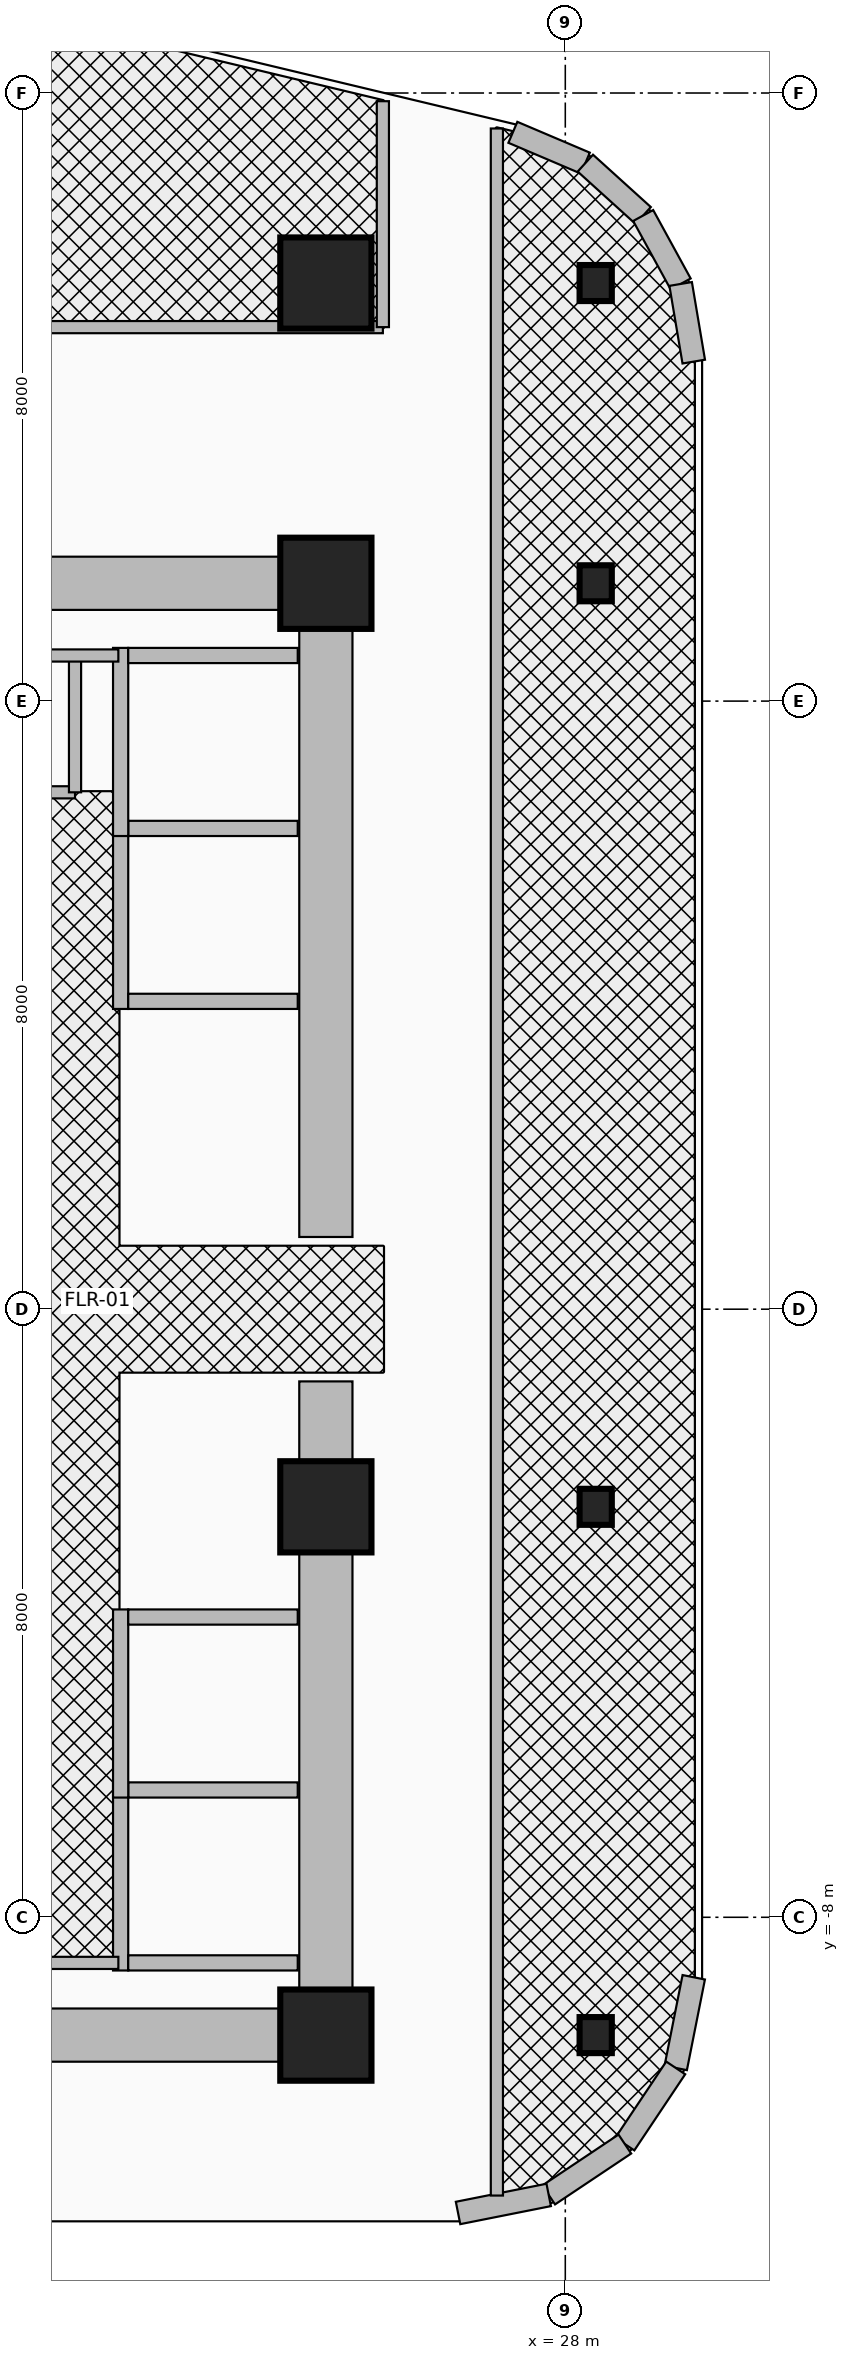
"""IFC4 building model, lengths in metres.
Left out: names, types, materials, properties, quantities, classifications, styles, units other than length and angle.
Written with IfcOpenShell. Run it as: python <this file> out.ifc"""

import sys

from ifc_helpers import new_model, si_unit, direction, frame, frame_2d, origin, origin_2d, place, context, subcontext, project, spatial, rectangle, i_section, extrude, source, transform, mapped, element, fill, save


model = new_model("IFC4")
c1 = context("Model", 3, precision=1e-05, world=origin(), true_north=direction((0.0, 1.0)))
c2 = subcontext(c1, "Body", "Model", "MODEL_VIEW")
j1 = project(units=[si_unit("LENGTHUNIT", "METRE"), si_unit("PLANEANGLEUNIT", "RADIAN")], contexts=[c1])
p1 = place(None, origin())
s1 = spatial("IfcSite", under=j1, at=p1, CompositionType="ELEMENT")
p2 = place(p1, origin())
s2 = spatial("IfcBuilding", under=s1, at=p2, CompositionType="ELEMENT")
p3 = place(p2, frame((0.0, 0.0, 101.1)))
s3 = spatial("IfcBuildingStorey", under=s2, at=p3, CompositionType="ELEMENT", Elevation=101.1)
for number, where, z_axis, x_axis in (
    (1, (24.85, -9.9, 0.0), (0.0, 0.0, 1.0), (0.0, 1.0, 0.0)),
    (2, (24.85, 0.95, 0.0), (0.0, 0.0, 1.0), (0.0, 1.0, 0.0)),
):
    element("IfcWall", number, at=place(p3, frame(where, z_axis=z_axis, x_axis=x_axis)), inside=s3, PredefinedType="SHEAR", context=c2, shape_type="SweptSolid", body=[
        extrude(rectangle(XDim=8.95, YDim=0.7, at=frame_2d((4.475, 0.0))), origin(), (0.0, 0.0, 1.0), 4.36),
    ])
for number, where, z_axis, x_axis in (
    (3, (15.85, 9.55, 0.0), (0.0, 0.0, 1.0), (1.0, 0.0, 0.0)),
    (4, (15.85, -9.55, 0.0), (0.0, 0.0, 1.0), (1.0, 0.0, 0.0)),
):
    element("IfcWall", number, at=place(p3, frame(where, z_axis=z_axis, x_axis=x_axis)), inside=s3, PredefinedType="SHEAR", context=c2, shape_type="SweptSolid", body=[
        extrude(rectangle(XDim=9.0, YDim=0.7, at=frame_2d((4.5, 0.0))), origin(), (0.0, 0.0, 1.0), 4.36),
    ])
m1 = source(origin(), c2, "Body", "SweptSolid", [
    extrude(rectangle(XDim=1.2, YDim=1.2, at=origin_2d()), origin(), (0.0, 0.0, 1.0), 4.6),
])
p4 = place(p3, frame((24.85, -9.55, 0.0), z_axis=(0.0, 0.0, 1.0), x_axis=(1.0, 0.0, 0.0)))
e5 = element("IfcColumn", 5, at=p4, inside=s3, PredefinedType="COLUMN", context=c2, shape_type="MappedRepresentation", body=[
    mapped(m1, transform((0.0, 0.0, 0.0), x_axis=(1.0, 0.0, 0.0), y_axis=(0.0, 1.0, 0.0), z_axis=(0.0, 0.0, 1.0), scale=1.0)),
])
m2 = source(origin(), c2, "Body", "SweptSolid", [
    extrude(i_section(OverallWidth=0.424, OverallDepth=0.474, WebThickness=0.048, FlangeThickness=0.077, at=origin_2d()), origin(), (0.0, 0.0, 1.0), 4.6),
])
p5 = place(p3, frame((28.4, -9.55, 0.0), z_axis=(0.0, 0.0, 1.0), x_axis=(1.0, 0.0, 0.0)))
e6 = element("IfcColumn", 6, at=p5, inside=s3, PredefinedType="COLUMN", context=c2, shape_type="MappedRepresentation", body=[
    mapped(m2, transform((0.0, 0.0, 0.0), x_axis=(1.0, 0.0, 0.0), y_axis=(0.0, 1.0, 0.0), z_axis=(0.0, 0.0, 1.0), scale=1.0)),
])
p6 = place(p3, frame((24.85, -2.6, 0.0), z_axis=(0.0, 0.0, 1.0), x_axis=(1.0, 0.0, 0.0)))
e7 = element("IfcColumn", 7, at=p6, inside=s3, PredefinedType="COLUMN", context=c2, shape_type="MappedRepresentation", body=[
    mapped(m1, transform((0.0, 0.0, 0.0), x_axis=(1.0, 0.0, 0.0), y_axis=(0.0, 1.0, 0.0), z_axis=(0.0, 0.0, 1.0), scale=1.0)),
])
p7 = place(p3, frame((28.4, -2.6, 0.0), z_axis=(0.0, 0.0, 1.0), x_axis=(1.0, 0.0, 0.0)))
e8 = element("IfcColumn", 8, at=p7, inside=s3, PredefinedType="COLUMN", context=c2, shape_type="MappedRepresentation", body=[
    mapped(m2, transform((0.0, 0.0, 0.0), x_axis=(1.0, 0.0, 0.0), y_axis=(0.0, 1.0, 0.0), z_axis=(0.0, 0.0, 1.0), scale=1.0)),
])
p8 = place(p3, frame((24.85, 9.55, 0.0), z_axis=(0.0, 0.0, 1.0), x_axis=(1.0, 0.0, 0.0)))
e9 = element("IfcColumn", 9, at=p8, inside=s3, PredefinedType="COLUMN", context=c2, shape_type="MappedRepresentation", body=[
    mapped(m1, transform((0.0, 0.0, 0.0), x_axis=(1.0, 0.0, 0.0), y_axis=(0.0, 1.0, 0.0), z_axis=(0.0, 0.0, 1.0), scale=1.0)),
])
p9 = place(p3, frame((28.4, 9.55, 0.0), z_axis=(0.0, 0.0, 1.0), x_axis=(1.0, 0.0, 0.0)))
e10 = element("IfcColumn", 10, at=p9, inside=s3, PredefinedType="COLUMN", context=c2, shape_type="MappedRepresentation", body=[
    mapped(m2, transform((0.0, 0.0, 0.0), x_axis=(1.0, 0.0, 0.0), y_axis=(0.0, 1.0, 0.0), z_axis=(0.0, 0.0, 1.0), scale=1.0)),
])
p10 = place(p3, frame((24.85, 13.5, 0.0), z_axis=(0.0, 0.0, 1.0), x_axis=(1.0, 0.0, 0.0)))
e11 = element("IfcColumn", 11, at=p10, inside=s3, PredefinedType="COLUMN", context=c2, shape_type="MappedRepresentation", body=[
    mapped(m1, transform((0.0, 0.0, 0.0), x_axis=(1.0, 0.0, 0.0), y_axis=(0.0, 1.0, 0.0), z_axis=(0.0, 0.0, 1.0), scale=1.0)),
])
p11 = place(p3, frame((28.4, 13.5, 0.0), z_axis=(0.0, 0.0, 1.0), x_axis=(1.0, 0.0, 0.0)))
e12 = element("IfcColumn", 12, at=p11, inside=s3, PredefinedType="COLUMN", context=c2, shape_type="MappedRepresentation", body=[
    mapped(m2, transform((0.0, 0.0, 0.0), x_axis=(1.0, 0.0, 0.0), y_axis=(0.0, 1.0, 0.0), z_axis=(0.0, 0.0, 1.0), scale=1.0)),
])
p12 = place(p3, frame((27.31, 15.483, 0.0), z_axis=(0.0, 0.0, 1.0), x_axis=(0.920250328759, -0.391330208927, 0.0)))
e13 = element("IfcWall", 13, at=p12, inside=s3, PredefinedType="SOLIDWALL", context=c2, shape_type="SweptSolid", body=[
    extrude(rectangle(XDim=1.036, YDim=0.3, at=frame_2d((0.518, 0.0))), origin(), (0.0, 0.0, 1.0), 4.36),
])
p13 = place(p3, frame((28.264, 15.077, 0.0), z_axis=(0.0, 0.0, 1.0), x_axis=(0.741208839713, -0.671274501178, 0.0)))
e14 = element("IfcWall", 14, at=p13, inside=s3, PredefinedType="SOLIDWALL", context=c2, shape_type="SweptSolid", body=[
    extrude(rectangle(XDim=1.026, YDim=0.3, at=frame_2d((0.513, 0.0))), origin(), (0.0, 0.0, 1.0), 4.36),
])
p14 = place(p3, frame((29.025, 14.388, 0.0), z_axis=(0.0, 0.0, 1.0), x_axis=(0.480284137298, -0.87711296163, 0.0)))
e15 = element("IfcWall", 15, at=p14, inside=s3, PredefinedType="SOLIDWALL", context=c2, shape_type="SweptSolid", body=[
    extrude(rectangle(XDim=1.027, YDim=0.3, at=frame_2d((0.513, 0.0))), origin(), (0.0, 0.0, 1.0), 4.36),
])
p15 = place(p3, frame((29.518, 13.488, 0.0), z_axis=(0.0, 0.0, 1.0), x_axis=(0.166156796952, -0.986099345313, 0.0)))
e16 = element("IfcWall", 16, at=p15, inside=s3, PredefinedType="SOLIDWALL", context=c2, shape_type="SweptSolid", body=[
    extrude(rectangle(XDim=1.036, YDim=0.3, at=frame_2d((0.518, 0.0))), origin(), (0.0, 0.0, 1.0), 4.36),
])
p16 = place(p3, frame((29.69, -8.789, 0.0), z_axis=(0.0, 0.0, 1.0), x_axis=(-0.194996050505, -0.980804027463, 0.0)))
e17 = element("IfcWall", 17, at=p16, inside=s3, PredefinedType="SOLIDWALL", context=c2, shape_type="SweptSolid", body=[
    extrude(rectangle(XDim=1.216, YDim=0.3, at=frame_2d((0.608, 0.0))), origin(), (0.0, 0.0, 1.0), 4.36),
])
for number, where, z_axis, x_axis in (
    (18, (29.453, -9.982, 0.0), (0.0, 0.0, 1.0), (-0.556, -0.831, 0.0)),
    (19, (28.783, -10.983, 0.0), (0.0, 0.0, 1.0), (-0.831, -0.556, 0.0)),
):
    element("IfcWall", number, at=place(p3, frame(where, z_axis=z_axis, x_axis=x_axis)), inside=s3, PredefinedType="SOLIDWALL", context=c2, shape_type="SweptSolid", body=[
        extrude(rectangle(XDim=1.205, YDim=0.3, at=frame_2d((0.603, 0.0))), origin(), (0.0, 0.0, 1.0), 4.36),
    ])
p17 = place(p3, frame((27.782, -11.653, 0.0), z_axis=(0.0, 0.0, 1.0), x_axis=(-0.980811661072, -0.194957650543, 0.0)))
e20 = element("IfcWall", 20, at=p17, inside=s3, PredefinedType="SOLIDWALL", context=c2, shape_type="SweptSolid", body=[
    extrude(rectangle(XDim=1.216, YDim=0.3, at=frame_2d((0.608, 0.0))), origin(), (0.0, 0.0, 1.0), 4.36),
])
p18 = place(p3, frame((22.15, -8.7, 0.0), z_axis=(0.0, 0.0, 1.0), x_axis=(0.0, 1.0, 0.0)))
e21 = element("IfcWall", 21, at=p18, inside=s3, PredefinedType="MOVABLE", context=c2, shape_type="SweptSolid", body=[
    extrude(rectangle(XDim=2.475, YDim=0.2, at=frame_2d((1.237, 0.0))), origin(), (0.0, 0.0, 1.0), 4.36),
])
p19 = place(p18, frame((0.688, 0.0, 0.0)))
e22 = element("IfcOpeningElement", 22, at=p19, cuts=e21, PredefinedType="OPENING", context=c2, shape_type="SweptSolid", body=[
    extrude(rectangle(XDim=1.1, YDim=2.1, at=frame_2d((0.55, 1.05))), frame((0.0, 0.115, 0.0), z_axis=(0.0, -1.0, 0.0), x_axis=(1.0, 0.0, 0.0)), (0.0, 0.0, 1.0), 0.23),
])
for number, where, z_axis, x_axis in (
    (23, (22.25, -8.6, 0.0), (0.0, 0.0, 1.0), (1.0, 0.0, 0.0)),
    (24, (22.25, -6.325, 0.0), (0.0, 0.0, 1.0), (1.0, 0.0, 0.0)),
):
    element("IfcWall", number, at=place(p3, frame(where, z_axis=z_axis, x_axis=x_axis)), inside=s3, PredefinedType="MOVABLE", context=c2, shape_type="SweptSolid", body=[
        extrude(rectangle(XDim=2.23, YDim=0.2, at=frame_2d((1.115, 0.0))), origin(), (0.0, 0.0, 1.0), 4.36),
    ])
p20 = place(p3, frame((22.15, -6.425, 0.0), z_axis=(0.0, 0.0, 1.0), x_axis=(0.0, 1.0, 0.0)))
e25 = element("IfcWall", 25, at=p20, inside=s3, PredefinedType="MOVABLE", context=c2, shape_type="SweptSolid", body=[
    extrude(rectangle(XDim=2.475, YDim=0.2, at=frame_2d((1.238, 0.0))), origin(), (0.0, 0.0, 1.0), 4.36),
])
p21 = place(p20, frame((0.688, 0.0, 0.0)))
e26 = element("IfcOpeningElement", 26, at=p21, cuts=e25, PredefinedType="OPENING", context=c2, shape_type="SweptSolid", body=[
    extrude(rectangle(XDim=1.1, YDim=2.1, at=frame_2d((0.55, 1.05))), frame((0.0, 0.115, 0.0), z_axis=(0.0, -1.0, 0.0), x_axis=(1.0, 0.0, 0.0)), (0.0, 0.0, 1.0), 0.23),
])
p22 = place(p3, frame((22.25, -4.05, 0.0), z_axis=(0.0, 0.0, 1.0), x_axis=(1.0, 0.0, 0.0)))
e27 = element("IfcWall", 27, at=p22, inside=s3, PredefinedType="MOVABLE", context=c2, shape_type="SweptSolid", body=[
    extrude(rectangle(XDim=2.23, YDim=0.2, at=frame_2d((1.115, 0.0))), origin(), (0.0, 0.0, 1.0), 4.36),
])
p23 = place(p3, frame((22.15, 3.95, 0.0), z_axis=(0.0, 0.0, 1.0), x_axis=(0.0, 1.0, 0.0)))
e28 = element("IfcWall", 28, at=p23, inside=s3, PredefinedType="MOVABLE", context=c2, shape_type="SweptSolid", body=[
    extrude(rectangle(XDim=2.475, YDim=0.2, at=frame_2d((1.238, 0.0))), origin(), (0.0, 0.0, 1.0), 4.36),
])
p24 = place(p23, frame((0.688, 0.0, 0.0)))
e29 = element("IfcOpeningElement", 29, at=p24, cuts=e28, PredefinedType="OPENING", context=c2, shape_type="SweptSolid", body=[
    extrude(rectangle(XDim=1.1, YDim=2.1, at=frame_2d((0.55, 1.05))), frame((0.0, 0.115, 0.0), z_axis=(0.0, -1.0, 0.0), x_axis=(1.0, 0.0, 0.0)), (0.0, 0.0, 1.0), 0.23),
])
for number, where, z_axis, x_axis in (
    (30, (22.25, 4.05, 0.0), (0.0, 0.0, 1.0), (1.0, 0.0, 0.0)),
    (31, (22.25, 6.325, 0.0), (0.0, 0.0, 1.0), (1.0, 0.0, 0.0)),
):
    element("IfcWall", number, at=place(p3, frame(where, z_axis=z_axis, x_axis=x_axis)), inside=s3, PredefinedType="MOVABLE", context=c2, shape_type="SweptSolid", body=[
        extrude(rectangle(XDim=2.23, YDim=0.2, at=frame_2d((1.115, 0.0))), origin(), (0.0, 0.0, 1.0), 3.145),
    ])
p25 = place(p3, frame((22.15, 6.225, 0.0), z_axis=(0.0, 0.0, 1.0), x_axis=(0.0, 1.0, 0.0)))
e32 = element("IfcWall", 32, at=p25, inside=s3, PredefinedType="MOVABLE", context=c2, shape_type="SweptSolid", body=[
    extrude(rectangle(XDim=2.475, YDim=0.2, at=frame_2d((1.237, 0.0))), origin(), (0.0, 0.0, 1.0), 4.36),
])
p26 = place(p25, frame((0.688, 0.0, 0.0)))
e33 = element("IfcOpeningElement", 33, at=p26, cuts=e32, PredefinedType="OPENING", context=c2, shape_type="SweptSolid", body=[
    extrude(rectangle(XDim=1.1, YDim=2.1, at=frame_2d((0.55, 1.05))), frame((0.0, 0.115, 0.0), z_axis=(0.0, -1.0, 0.0), x_axis=(1.0, 0.0, 0.0)), (0.0, 0.0, 1.0), 0.23),
])
p27 = place(p3, frame((22.25, 8.6, 0.0), z_axis=(0.0, 0.0, 1.0), x_axis=(1.0, 0.0, 0.0)))
e34 = element("IfcWall", 34, at=p27, inside=s3, PredefinedType="MOVABLE", context=c2, shape_type="SweptSolid", body=[
    extrude(rectangle(XDim=2.23, YDim=0.2, at=frame_2d((1.115, 0.0))), origin(), (0.0, 0.0, 1.0), 3.145),
])
p28 = place(p3, frame((20.35, 6.8, 0.0), z_axis=(0.0, 0.0, 1.0), x_axis=(1.0, 0.0, 0.0)))
e35 = element("IfcWall", 35, at=p28, inside=s3, PredefinedType="PARTITIONING", context=c2, shape_type="SweptSolid", body=[
    extrude(rectangle(XDim=1.2, YDim=0.16, at=frame_2d((0.6, 0.0))), origin(), (0.0, 0.0, 1.0), 4.36),
])
p29 = place(p28, frame((0.175, 0.0, 0.0)))
e36 = element("IfcOpeningElement", 36, at=p29, cuts=e35, PredefinedType="OPENING", context=c2, shape_type="SweptSolid", body=[
    extrude(rectangle(XDim=0.85, YDim=2.05, at=frame_2d((0.425, 1.025))), frame((0.0, 0.095, 0.0), z_axis=(0.0, -1.0, 0.0), x_axis=(1.0, 0.0, 0.0)), (0.0, 0.0, 1.0), 0.19),
])
p30 = place(p3, frame((21.55, 6.8, 0.0), z_axis=(0.0, 0.0, 1.0), x_axis=(0.0, 1.0, 0.0)))
e37 = element("IfcWall", 37, at=p30, inside=s3, PredefinedType="PARTITIONING", context=c2, shape_type="SweptSolid", body=[
    extrude(rectangle(XDim=1.8, YDim=0.16, at=frame_2d((0.9, 0.0))), origin(), (0.0, 0.0, 1.0), 4.36),
])
for number, where, z_axis, x_axis in (
    (38, (20.3, -8.6, 0.0), (0.0, 0.0, 1.0), (1.0, 0.0, 0.0)),
    (39, (20.3, 8.6, 0.0), (0.0, 0.0, 1.0), (1.0, 0.0, 0.0)),
):
    element("IfcWall", number, at=place(p3, frame(where, z_axis=z_axis, x_axis=x_axis)), inside=s3, PredefinedType="PARTITIONING", context=c2, shape_type="SweptSolid", body=[
        extrude(rectangle(XDim=1.82, YDim=0.16, at=frame_2d((0.91, 0.0))), origin(), (0.0, 0.0, 1.0), 4.36),
    ])
p31 = place(p3, frame((-10.05, 12.92, 0.0), z_axis=(0.0, 0.0, 1.0), x_axis=(1.0, 0.0, 0.0)))
e40 = element("IfcWall", 40, at=p31, inside=s3, PredefinedType="PARTITIONING", context=c2, shape_type="SweptSolid", body=[
    extrude(rectangle(XDim=35.65, YDim=0.16, at=frame_2d((17.825, 0.0))), origin(), (0.0, 0.0, 1.0), 3.566),
])
p32 = place(p31, frame((7.0, 0.0, 0.0)))
e41 = element("IfcOpeningElement", 41, at=p32, cuts=e40, PredefinedType="OPENING", context=c2, shape_type="SweptSolid", body=[
    extrude(rectangle(XDim=1.8, YDim=2.15, at=frame_2d((0.9, 1.075))), frame((0.0, 0.095, 0.0), z_axis=(0.0, -1.0, 0.0), x_axis=(1.0, 0.0, 0.0)), (0.0, 0.0, 1.0), 0.19),
])
p33 = place(p31, frame((23.3, 0.0, 0.0)))
e42 = element("IfcOpeningElement", 42, at=p33, cuts=e40, PredefinedType="OPENING", context=c2, shape_type="SweptSolid", body=[
    extrude(rectangle(XDim=1.8, YDim=2.15, at=frame_2d((0.9, 1.075))), frame((0.0, 0.095, 0.0), z_axis=(0.0, -1.0, 0.0), x_axis=(1.0, 0.0, 0.0)), (0.0, 0.0, 1.0), 0.19),
])
p34 = place(p3, frame((25.6, 12.92, 0.0), z_axis=(0.0, 0.0, 1.0), x_axis=(0.0, 1.0, 0.0)))
e43 = element("IfcWall", 43, at=p34, inside=s3, PredefinedType="PARTITIONING", context=c2, shape_type="SweptSolid", body=[
    extrude(rectangle(XDim=2.972, YDim=0.16, at=frame_2d((1.486, 0.0))), origin(), (0.0, 0.0, 1.0), 3.566),
])
p35 = place(p3, frame((27.1, -11.661, 0.0), z_axis=(0.0, 0.0, 1.0), x_axis=(0.0, 1.0, 0.0)))
e44 = element("IfcWall", 44, at=p35, inside=s3, PredefinedType="PARTITIONING", context=c2, shape_type="SweptSolid", body=[
    extrude(rectangle(XDim=27.194, YDim=0.16, at=frame_2d((13.597, 0.0))), origin(), (0.0, 0.0, 1.0), 3.566),
])
p36 = place(p35, frame((12.0, 0.0, 0.0)))
e45 = element("IfcOpeningElement", 45, at=p36, cuts=e44, PredefinedType="OPENING", context=c2, shape_type="SweptSolid", body=[
    extrude(rectangle(XDim=1.8, YDim=2.15, at=frame_2d((0.9, 1.075))), frame((0.0, 0.095, 0.0), z_axis=(0.0, -1.0, 0.0), x_axis=(1.0, 0.0, 0.0)), (0.0, 0.0, 1.0), 0.19),
])
p37 = place(p19, origin())
e46 = element("IfcDoor", 46, at=p37, inside=s3, OperationType="DOUBLE_DOOR_SLIDING", PredefinedType="DOOR", context=c2, shape_type="SweptSolid", body=[
    extrude(rectangle(XDim=1.1, YDim=2.1, at=frame_2d((0.55, 1.05))), frame((0.0, 0.025, 0.0), z_axis=(0.0, -1.0, 0.0), x_axis=(1.0, 0.0, 0.0)), (0.0, 0.0, 1.0), 0.05),
])
fill(e22, e46)
p38 = place(p21, origin())
e47 = element("IfcDoor", 47, at=p38, inside=s3, OperationType="DOUBLE_DOOR_SLIDING", PredefinedType="DOOR", context=c2, shape_type="SweptSolid", body=[
    extrude(rectangle(XDim=1.1, YDim=2.1, at=frame_2d((0.55, 1.05))), frame((0.0, 0.025, 0.0), z_axis=(0.0, -1.0, 0.0), x_axis=(1.0, 0.0, 0.0)), (0.0, 0.0, 1.0), 0.05),
])
fill(e26, e47)
p39 = place(p24, origin())
e48 = element("IfcDoor", 48, at=p39, inside=s3, OperationType="DOUBLE_DOOR_SLIDING", PredefinedType="DOOR", context=c2, shape_type="SweptSolid", body=[
    extrude(rectangle(XDim=1.1, YDim=2.1, at=frame_2d((0.55, 1.05))), frame((0.0, 0.025, 0.0), z_axis=(0.0, -1.0, 0.0), x_axis=(1.0, 0.0, 0.0)), (0.0, 0.0, 1.0), 0.05),
])
fill(e29, e48)
p40 = place(p26, origin())
e49 = element("IfcDoor", 49, at=p40, inside=s3, OperationType="DOUBLE_DOOR_SLIDING", PredefinedType="DOOR", context=c2, shape_type="SweptSolid", body=[
    extrude(rectangle(XDim=1.1, YDim=2.1, at=frame_2d((0.55, 1.05))), frame((0.0, 0.025, 0.0), z_axis=(0.0, -1.0, 0.0), x_axis=(1.0, 0.0, 0.0)), (0.0, 0.0, 1.0), 0.05),
])
fill(e33, e49)
p41 = place(p29, origin())
e50 = element("IfcDoor", 50, at=p41, inside=s3, OperationType="SINGLE_SWING_LEFT", PredefinedType="DOOR", context=c2, shape_type="SweptSolid", body=[
    extrude(rectangle(XDim=0.85, YDim=2.05, at=frame_2d((0.425, 1.025))), frame((0.0, 0.025, 0.0), z_axis=(0.0, -1.0, 0.0), x_axis=(1.0, 0.0, 0.0)), (0.0, 0.0, 1.0), 0.05),
])
fill(e36, e50)
p42 = place(p36, frame((1.8, 0.0, 0.0), z_axis=(0.0, 0.0, 1.0), x_axis=(-1.0, 0.0, 0.0)))
e51 = element("IfcDoor", 51, at=p42, inside=s3, OperationType="DOUBLE_DOOR_SINGLE_SWING", PredefinedType="DOOR", context=c2, shape_type="SweptSolid", body=[
    extrude(rectangle(XDim=1.8, YDim=2.15, at=frame_2d((0.9, 1.075))), frame((0.0, 0.025, 0.0), z_axis=(0.0, -1.0, 0.0), x_axis=(1.0, 0.0, 0.0)), (0.0, 0.0, 1.0), 0.05),
])
fill(e45, e51)
save(model, sys.argv[1])
